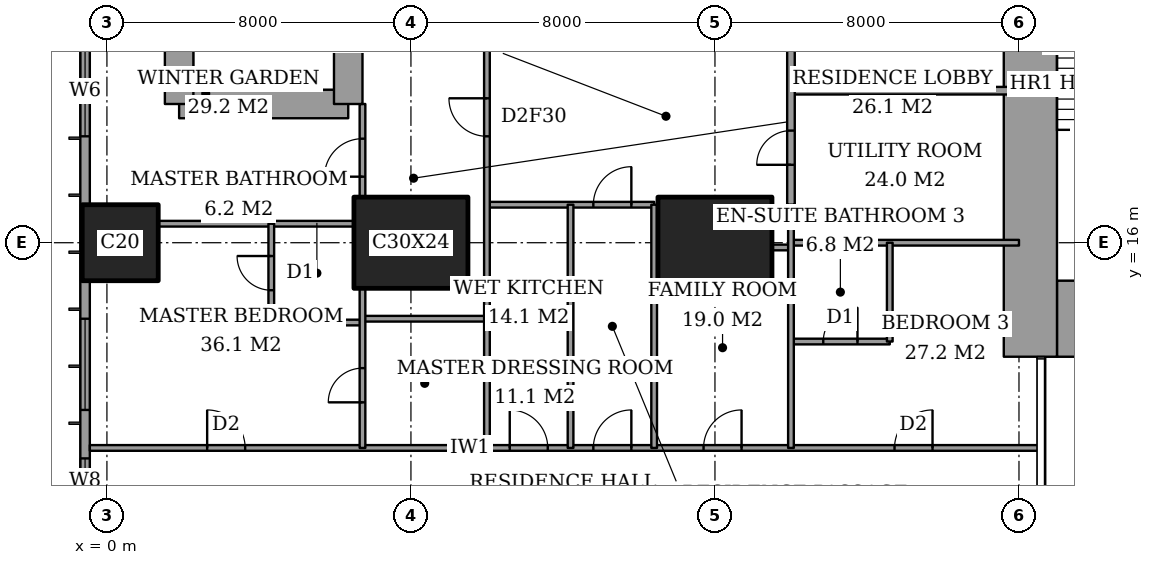
"""IFC4 building model, lengths in metres.
Left out: names, types, materials, properties, quantities, classifications, styles, units other than length and angle.
Written with IfcOpenShell. Run it as: python <this file> out.ifc"""

import sys

from ifc_helpers import new_model, si_unit, direction, frame, frame_2d, origin, origin_2d, place, context, subcontext, project, spatial, rectangle, extrude, element, fill, save


model = new_model("IFC4")
c1 = context("Model", 3, precision=1e-05, world=origin(), true_north=direction((0.0, 1.0)))
c2 = subcontext(c1, "Body", "Model", "MODEL_VIEW")
j1 = project(units=[si_unit("LENGTHUNIT", "METRE"), si_unit("PLANEANGLEUNIT", "RADIAN")], contexts=[c1])
p1 = place(None, origin())
s1 = spatial("IfcSite", under=j1, at=p1, CompositionType="ELEMENT")
p2 = place(p1, origin())
s2 = spatial("IfcBuilding", under=s1, at=p2, CompositionType="ELEMENT")
p3 = place(p2, frame((0.0, 0.0, 40.4)))
s3 = spatial("IfcBuildingStorey", under=s2, at=p3, CompositionType="ELEMENT", Elevation=40.4)
p4 = place(p3, frame((0.35, 16.0, 0.0), z_axis=(0.0, 0.0, 1.0), x_axis=(1.0, 0.0, 0.0)))
e1 = element("IfcColumn", 1, at=p4, inside=s3, PredefinedType="COLUMN", context=c2, shape_type="SweptSolid", body=[
    extrude(rectangle(XDim=2.0, YDim=2.0, at=origin_2d()), origin(), (0.0, 0.0, 1.0), 3.6),
])
for number, where, z_axis, x_axis in (
    (2, (8.0, 16.0, 0.0), (0.0, 0.0, 1.0), (1.0, 0.0, 0.0)),
    (3, (16.0, 16.0, 0.0), (0.0, 0.0, 1.0), (1.0, 0.0, 0.0)),
):
    element("IfcColumn", number, at=place(p3, frame(where, z_axis=z_axis, x_axis=x_axis)), inside=s3, PredefinedType="COLUMN", context=c2, shape_type="SweptSolid", body=[
        extrude(rectangle(XDim=3.0, YDim=2.4, at=origin_2d()), origin(), (0.0, 0.0, 1.0), 3.6),
    ])
p5 = place(p3, frame((25.0, 14.0, 0.0), z_axis=(0.0, 0.0, 1.0), x_axis=(1.0, 0.0, 0.0)))
e4 = element("IfcWall", 4, at=p5, inside=s3, PredefinedType="SHEAR", context=c2, shape_type="SweptSolid", body=[
    extrude(rectangle(XDim=3.15, YDim=2.0, at=frame_2d((1.575, 0.0))), origin(), (0.0, 0.0, 1.0), 3.6),
])
p6 = place(p3, frame((24.3, 13.0, 0.0), z_axis=(0.0, 0.0, 1.0), x_axis=(0.0, 1.0, 0.0)))
e5 = element("IfcWall", 5, at=p6, inside=s3, PredefinedType="SHEAR", context=c2, shape_type="SweptSolid", body=[
    extrude(rectangle(XDim=10.15, YDim=1.4, at=frame_2d((5.075, 0.0))), origin(), (0.0, 0.0, 1.0), 3.6),
])
p7 = place(p3, frame((1.9, 19.65, 0.0), z_axis=(0.0, 0.0, 1.0), x_axis=(1.0, 0.0, 0.0)))
e6 = element("IfcWall", 6, at=p7, inside=s3, PredefinedType="SHEAR", context=c2, shape_type="SweptSolid", body=[
    extrude(rectangle(XDim=4.45, YDim=0.75, at=frame_2d((2.225, 0.0))), origin(), (0.0, 0.0, 1.0), 3.6),
])
p8 = place(p3, frame((6.35, 19.65, 0.0), z_axis=(0.0, 0.0, 1.0), x_axis=(0.0, 1.0, 0.0)))
e7 = element("IfcWall", 7, at=p8, inside=s3, PredefinedType="SHEAR", context=c2, shape_type="SweptSolid", body=[
    extrude(rectangle(XDim=8.7, YDim=0.75, at=frame_2d((4.35, 0.0))), origin(), (0.0, 0.0, 1.0), 3.6),
])
p9 = place(p8, frame((6.725, 0.0, 0.0)))
e8 = element("IfcOpeningElement", 8, at=p9, cuts=e7, PredefinedType="OPENING", context=c2, shape_type="SweptSolid", body=[
    extrude(rectangle(XDim=1.0, YDim=2.1, at=frame_2d((0.5, 1.05))), frame((0.0, 0.385, 0.0), z_axis=(0.0, -1.0, 0.0), x_axis=(1.0, 0.0, 0.0)), (0.0, 0.0, 1.0), 0.77),
])
p10 = place(p3, frame((1.9, 28.35, 0.0), z_axis=(0.0, 0.0, 1.0), x_axis=(0.0, -1.0, 0.0)))
e9 = element("IfcWall", 9, at=p10, inside=s3, PredefinedType="SHEAR", context=c2, shape_type="SweptSolid", body=[
    extrude(rectangle(XDim=8.7, YDim=0.75, at=frame_2d((4.35, 0.0))), origin(), (0.0, 0.0, 1.0), 3.6),
])
p11 = place(p3, frame((-0.575, 44.825, 0.0), z_axis=(0.0, 0.0, 1.0), x_axis=(0.0, -1.0, 0.0)))
e10 = element("IfcWall", 10, at=p11, inside=s3, PredefinedType="SOLIDWALL", context=c2, shape_type="SweptSolid", body=[
    extrude(rectangle(XDim=41.65, YDim=0.25, at=frame_2d((20.825, 0.0))), origin(), (0.0, 0.0, 1.0), 3.6),
])
p12 = place(p11, frame((0.775, 0.0, 0.6)))
e11 = element("IfcOpeningElement", 11, at=p12, cuts=e10, PredefinedType="OPENING", context=c2, shape_type="SweptSolid", body=[
    extrude(rectangle(XDim=2.4, YDim=2.0, at=frame_2d((1.2, 1.0))), frame((0.0, 0.135, 0.0), z_axis=(0.0, -1.0, 0.0), x_axis=(1.0, 0.0, 0.0)), (0.0, 0.0, 1.0), 0.27),
])
p13 = place(p11, frame((6.1, 0.0, 0.6)))
e12 = element("IfcOpeningElement", 12, at=p13, cuts=e10, PredefinedType="OPENING", context=c2, shape_type="SweptSolid", body=[
    extrude(rectangle(XDim=1.2, YDim=2.0, at=frame_2d((0.6, 1.0))), frame((0.0, 0.135, 0.0), z_axis=(0.0, -1.0, 0.0), x_axis=(1.0, 0.0, 0.0)), (0.0, 0.0, 1.0), 0.27),
])
p14 = place(p11, frame((8.425, 0.0, 0.6)))
e13 = element("IfcOpeningElement", 13, at=p14, cuts=e10, PredefinedType="OPENING", context=c2, shape_type="SweptSolid", body=[
    extrude(rectangle(XDim=2.4, YDim=2.0, at=frame_2d((1.2, 1.0))), frame((0.0, 0.135, 0.0), z_axis=(0.0, -1.0, 0.0), x_axis=(1.0, 0.0, 0.0)), (0.0, 0.0, 1.0), 0.27),
])
p15 = place(p11, frame((15.625, 0.0, 0.6)))
e14 = element("IfcOpeningElement", 14, at=p15, cuts=e10, PredefinedType="OPENING", context=c2, shape_type="SweptSolid", body=[
    extrude(rectangle(XDim=2.4, YDim=2.0, at=frame_2d((1.2, 1.0))), frame((0.0, 0.135, 0.0), z_axis=(0.0, -1.0, 0.0), x_axis=(1.0, 0.0, 0.0)), (0.0, 0.0, 1.0), 0.27),
])
p16 = place(p11, frame((23.625, 0.0, 0.6)))
e15 = element("IfcOpeningElement", 15, at=p16, cuts=e10, PredefinedType="OPENING", context=c2, shape_type="SweptSolid", body=[
    extrude(rectangle(XDim=2.4, YDim=2.0, at=frame_2d((1.2, 1.0))), frame((0.0, 0.135, 0.0), z_axis=(0.0, -1.0, 0.0), x_axis=(1.0, 0.0, 0.0)), (0.0, 0.0, 1.0), 0.27),
])
p17 = place(p11, frame((30.825, 0.0, 0.6)))
e16 = element("IfcOpeningElement", 16, at=p17, cuts=e10, PredefinedType="OPENING", context=c2, shape_type="SweptSolid", body=[
    extrude(rectangle(XDim=2.4, YDim=2.0, at=frame_2d((1.2, 1.0))), frame((0.0, 0.135, 0.0), z_axis=(0.0, -1.0, 0.0), x_axis=(1.0, 0.0, 0.0)), (0.0, 0.0, 1.0), 0.27),
])
p18 = place(p11, frame((34.5, 0.0, 0.6)))
e17 = element("IfcOpeningElement", 17, at=p18, cuts=e10, PredefinedType="OPENING", context=c2, shape_type="SweptSolid", body=[
    extrude(rectangle(XDim=1.2, YDim=2.0, at=frame_2d((0.6, 1.0))), frame((0.0, 0.135, 0.0), z_axis=(0.0, -1.0, 0.0), x_axis=(1.0, 0.0, 0.0)), (0.0, 0.0, 1.0), 0.27),
])
p19 = place(p11, frame((38.475, 0.0, 0.6)))
e18 = element("IfcOpeningElement", 18, at=p19, cuts=e10, PredefinedType="OPENING", context=c2, shape_type="SweptSolid", body=[
    extrude(rectangle(XDim=2.4, YDim=2.0, at=frame_2d((1.2, 1.0))), frame((0.0, 0.135, 0.0), z_axis=(0.0, -1.0, 0.0), x_axis=(1.0, 0.0, 0.0)), (0.0, 0.0, 1.0), 0.27),
])
p20 = place(p3, frame((-0.45, 10.6, 0.0), z_axis=(0.0, 0.0, 1.0), x_axis=(1.0, 0.0, 0.0)))
e19 = element("IfcWall", 19, at=p20, inside=s3, PredefinedType="PARTITIONING", context=c2, shape_type="SweptSolid", body=[
    extrude(rectangle(XDim=25.011, YDim=0.15, at=frame_2d((12.505, 0.0))), origin(), (0.0, 0.0, 1.0), 3.35),
])
p21 = place(p20, frame((13.25, 0.0, 0.0)))
e20 = element("IfcOpeningElement", 20, at=p21, cuts=e19, PredefinedType="OPENING", context=c2, shape_type="SweptSolid", body=[
    extrude(rectangle(XDim=1.0, YDim=2.1, at=frame_2d((0.5, 1.05))), frame((0.0, 0.085, 0.0), z_axis=(0.0, -1.0, 0.0), x_axis=(1.0, 0.0, 0.0)), (0.0, 0.0, 1.0), 0.17),
])
p22 = place(p20, frame((3.087, 0.0, 0.0)))
e21 = element("IfcOpeningElement", 21, at=p22, cuts=e19, PredefinedType="OPENING", context=c2, shape_type="SweptSolid", body=[
    extrude(rectangle(XDim=1.0, YDim=2.1, at=frame_2d((0.5, 1.05))), frame((0.0, 0.085, 0.0), z_axis=(0.0, -1.0, 0.0), x_axis=(1.0, 0.0, 0.0)), (0.0, 0.0, 1.0), 0.17),
])
p23 = place(p20, frame((11.05, 0.0, 0.0)))
e22 = element("IfcOpeningElement", 22, at=p23, cuts=e19, PredefinedType="OPENING", context=c2, shape_type="SweptSolid", body=[
    extrude(rectangle(XDim=1.0, YDim=2.1, at=frame_2d((0.5, 1.05))), frame((0.0, 0.085, 0.0), z_axis=(0.0, -1.0, 0.0), x_axis=(1.0, 0.0, 0.0)), (0.0, 0.0, 1.0), 0.17),
])
p24 = place(p20, frame((16.15, 0.0, 0.0)))
e23 = element("IfcOpeningElement", 23, at=p24, cuts=e19, PredefinedType="OPENING", context=c2, shape_type="SweptSolid", body=[
    extrude(rectangle(XDim=1.0, YDim=2.1, at=frame_2d((0.5, 1.05))), frame((0.0, 0.085, 0.0), z_axis=(0.0, -1.0, 0.0), x_axis=(1.0, 0.0, 0.0)), (0.0, 0.0, 1.0), 0.17),
])
p25 = place(p20, frame((21.175, 0.0, 0.0)))
e24 = element("IfcOpeningElement", 24, at=p25, cuts=e19, PredefinedType="OPENING", context=c2, shape_type="SweptSolid", body=[
    extrude(rectangle(XDim=1.0, YDim=2.1, at=frame_2d((0.5, 1.05))), frame((0.0, 0.085, 0.0), z_axis=(0.0, -1.0, 0.0), x_axis=(1.0, 0.0, 0.0)), (0.0, 0.0, 1.0), 0.17),
])
p26 = place(p3, frame((18.0, 13.4, 0.0), z_axis=(0.0, 0.0, 1.0), x_axis=(1.0, 0.0, 0.0)))
e25 = element("IfcWall", 25, at=p26, inside=s3, PredefinedType="PARTITIONING", context=c2, shape_type="SweptSolid", body=[
    extrude(rectangle(XDim=2.6, YDim=0.15, at=frame_2d((1.3, 0.0))), origin(), (0.0, 0.0, 1.0), 3.35),
])
p27 = place(p26, frame((0.85, 0.0, 0.0)))
e26 = element("IfcOpeningElement", 26, at=p27, cuts=e25, PredefinedType="OPENING", context=c2, shape_type="SweptSolid", body=[
    extrude(rectangle(XDim=0.9, YDim=2.1, at=frame_2d((0.45, 1.05))), frame((0.0, 0.085, 0.0), z_axis=(0.0, -1.0, 0.0), x_axis=(1.0, 0.0, 0.0)), (0.0, 0.0, 1.0), 0.17),
])
p28 = place(p3, frame((4.325, 13.9, 0.0), z_axis=(0.0, 0.0, 1.0), x_axis=(1.0, 0.0, 0.0)))
e27 = element("IfcWall", 27, at=p28, inside=s3, PredefinedType="PARTITIONING", context=c2, shape_type="SweptSolid", body=[
    extrude(rectangle(XDim=2.4, YDim=0.15, at=frame_2d((1.2, 0.0))), origin(), (0.0, 0.0, 1.0), 3.35),
])
p29 = place(p3, frame((6.725, 14.0, 0.0), z_axis=(0.0, 0.0, 1.0), x_axis=(1.0, 0.0, 0.0)))
e28 = element("IfcWall", 28, at=p29, inside=s3, PredefinedType="PARTITIONING", context=c2, shape_type="SweptSolid", body=[
    extrude(rectangle(XDim=3.275, YDim=0.15, at=frame_2d((1.637, 0.0))), origin(), (0.0, 0.0, 1.0), 3.35),
])
p30 = place(p3, frame((17.5, 15.875, 0.0), z_axis=(0.0, 0.0, 1.0), x_axis=(1.0, 0.0, 0.0)))
e29 = element("IfcWall", 29, at=p30, inside=s3, PredefinedType="PARTITIONING", context=c2, shape_type="SweptSolid", body=[
    extrude(rectangle(XDim=0.5, YDim=0.15, at=frame_2d((0.25, 0.0))), origin(), (0.0, 0.0, 1.0), 2.634),
])
p31 = place(p3, frame((18.0, 16.0, 0.0), z_axis=(0.0, 0.0, 1.0), x_axis=(1.0, 0.0, 0.0)))
e30 = element("IfcWall", 30, at=p31, inside=s3, PredefinedType="PARTITIONING", context=c2, shape_type="SweptSolid", body=[
    extrude(rectangle(XDim=6.0, YDim=0.15, at=frame_2d((3.0, 0.0))), origin(), (0.0, 0.0, 1.0), 2.634),
])
p32 = place(p3, frame((1.35, 16.5, 0.0), z_axis=(0.0, 0.0, 1.0), x_axis=(1.0, 0.0, 0.0)))
e31 = element("IfcWall", 31, at=p32, inside=s3, PredefinedType="PARTITIONING", context=c2, shape_type="SweptSolid", body=[
    extrude(rectangle(XDim=5.15, YDim=0.15, at=frame_2d((2.575, 0.0))), origin(), (0.0, 0.0, 1.0), 3.35),
])
p33 = place(p3, frame((10.0, 17.0, 0.0), z_axis=(0.0, 0.0, 1.0), x_axis=(1.0, 0.0, 0.0)))
e32 = element("IfcWall", 32, at=p33, inside=s3, PredefinedType="PARTITIONING", context=c2, shape_type="SweptSolid", body=[
    extrude(rectangle(XDim=4.4, YDim=0.15, at=frame_2d((2.2, 0.0))), origin(), (0.0, 0.0, 1.0), 3.35),
])
p34 = place(p33, frame((2.8, 0.0, 0.0)))
e33 = element("IfcOpeningElement", 33, at=p34, cuts=e32, PredefinedType="OPENING", context=c2, shape_type="SweptSolid", body=[
    extrude(rectangle(XDim=1.0, YDim=2.1, at=frame_2d((0.5, 1.05))), frame((0.0, 0.085, 0.0), z_axis=(0.0, -1.0, 0.0), x_axis=(1.0, 0.0, 0.0)), (0.0, 0.0, 1.0), 0.17),
])
p35 = place(p3, frame((18.0, 20.0, 0.0), z_axis=(0.0, 0.0, 1.0), x_axis=(1.0, 0.0, 0.0)))
e34 = element("IfcWall", 34, at=p35, inside=s3, PredefinedType="PARTITIONING", context=c2, shape_type="SweptSolid", body=[
    extrude(rectangle(XDim=6.0, YDim=0.2, at=frame_2d((3.0, 0.0))), origin(), (0.0, 0.0, 1.0), 3.35),
])
p36 = place(p3, frame((4.325, 13.9, 0.0), z_axis=(0.0, 0.0, 1.0), x_axis=(0.0, 1.0, 0.0)))
e35 = element("IfcWall", 35, at=p36, inside=s3, PredefinedType="PARTITIONING", context=c2, shape_type="SweptSolid", body=[
    extrude(rectangle(XDim=2.6, YDim=0.15, at=frame_2d((1.3, 0.0))), origin(), (0.0, 0.0, 1.0), 3.35),
])
p37 = place(p36, frame((0.85, 0.0, 0.0)))
e36 = element("IfcOpeningElement", 36, at=p37, cuts=e35, PredefinedType="OPENING", context=c2, shape_type="SweptSolid", body=[
    extrude(rectangle(XDim=0.9, YDim=2.1, at=frame_2d((0.45, 1.05))), frame((0.0, 0.085, 0.0), z_axis=(0.0, -1.0, 0.0), x_axis=(1.0, 0.0, 0.0)), (0.0, 0.0, 1.0), 0.17),
])
p38 = place(p3, frame((6.725, 10.6, 0.0), z_axis=(0.0, 0.0, 1.0), x_axis=(0.0, 1.0, 0.0)))
e37 = element("IfcWall", 37, at=p38, inside=s3, PredefinedType="PARTITIONING", context=c2, shape_type="SweptSolid", body=[
    extrude(rectangle(XDim=4.2, YDim=0.15, at=frame_2d((2.1, 0.0))), origin(), (0.0, 0.0, 1.0), 3.35),
])
p39 = place(p38, frame((1.2, 0.0, 0.0)))
e38 = element("IfcOpeningElement", 38, at=p39, cuts=e37, PredefinedType="OPENING", context=c2, shape_type="SweptSolid", body=[
    extrude(rectangle(XDim=0.9, YDim=2.1, at=frame_2d((0.45, 1.05))), frame((0.0, 0.085, 0.0), z_axis=(0.0, -1.0, 0.0), x_axis=(1.0, 0.0, 0.0)), (0.0, 0.0, 1.0), 0.17),
])
p40 = place(p3, frame((6.725, 17.2, 0.0), z_axis=(0.0, 0.0, 1.0), x_axis=(0.0, 1.0, 0.0)))
e39 = element("IfcWall", 39, at=p40, inside=s3, PredefinedType="PARTITIONING", context=c2, shape_type="SweptSolid", body=[
    extrude(rectangle(XDim=2.45, YDim=0.15, at=frame_2d((1.225, 0.0))), origin(), (0.0, 0.0, 1.0), 3.35),
])
p41 = place(p40, frame((0.538, 0.0, 0.0)))
e40 = element("IfcOpeningElement", 40, at=p41, cuts=e39, PredefinedType="OPENING", context=c2, shape_type="SweptSolid", body=[
    extrude(rectangle(XDim=1.0, YDim=2.1, at=frame_2d((0.5, 1.05))), frame((0.0, 0.085, 0.0), z_axis=(0.0, -1.0, 0.0), x_axis=(1.0, 0.0, 0.0)), (0.0, 0.0, 1.0), 0.17),
])
p42 = place(p3, frame((10.0, 10.6, 0.0), z_axis=(0.0, 0.0, 1.0), x_axis=(0.0, 1.0, 0.0)))
e41 = element("IfcWall", 41, at=p42, inside=s3, PredefinedType="PARTITIONING", context=c2, shape_type="SweptSolid", body=[
    extrude(rectangle(XDim=11.0, YDim=0.15, at=frame_2d((5.5, 0.0))), origin(), (0.0, 0.0, 1.0), 3.35),
])
p43 = place(p42, frame((8.2, 0.0, 0.0)))
e42 = element("IfcOpeningElement", 42, at=p43, cuts=e41, PredefinedType="OPENING", context=c2, shape_type="SweptSolid", body=[
    extrude(rectangle(XDim=1.0, YDim=2.1, at=frame_2d((0.5, 1.05))), frame((0.0, 0.085, 0.0), z_axis=(0.0, -1.0, 0.0), x_axis=(1.0, 0.0, 0.0)), (0.0, 0.0, 1.0), 0.17),
])
for number, where, z_axis, x_axis in (
    (43, (12.2, 10.6, 0.0), (0.0, 0.0, 1.0), (0.0, 1.0, 0.0)),
    (44, (14.4, 10.6, 0.0), (0.0, 0.0, 1.0), (0.0, 1.0, 0.0)),
):
    element("IfcWall", number, at=place(p3, frame(where, z_axis=z_axis, x_axis=x_axis)), inside=s3, PredefinedType="PARTITIONING", context=c2, shape_type="SweptSolid", body=[
        extrude(rectangle(XDim=6.4, YDim=0.15, at=frame_2d((3.2, 0.0))), origin(), (0.0, 0.0, 1.0), 3.35),
    ])
p44 = place(p3, frame((18.0, 17.0, 0.0), z_axis=(0.0, 0.0, 1.0), x_axis=(0.0, 1.0, 0.0)))
e45 = element("IfcWall", 45, at=p44, inside=s3, PredefinedType="PARTITIONING", context=c2, shape_type="SweptSolid", body=[
    extrude(rectangle(XDim=7.0, YDim=0.2, at=frame_2d((3.5, 0.0))), origin(), (0.0, 0.0, 1.0), 3.35),
])
p45 = place(p44, frame((4.4, 0.0, 0.0)))
e46 = element("IfcOpeningElement", 46, at=p45, cuts=e45, PredefinedType="OPENING", context=c2, shape_type="SweptSolid", body=[
    extrude(rectangle(XDim=1.2, YDim=2.4, at=frame_2d((0.6, 1.2))), frame((0.0, 0.11, 0.0), z_axis=(0.0, -1.0, 0.0), x_axis=(1.0, 0.0, 0.0)), (0.0, 0.0, 1.0), 0.22),
])
p46 = place(p44, frame((1.05, 0.0, 0.0)))
e47 = element("IfcOpeningElement", 47, at=p46, cuts=e45, PredefinedType="OPENING", context=c2, shape_type="SweptSolid", body=[
    extrude(rectangle(XDim=0.9, YDim=2.1, at=frame_2d((0.45, 1.05))), frame((0.0, 0.11, 0.0), z_axis=(0.0, -1.0, 0.0), x_axis=(1.0, 0.0, 0.0)), (0.0, 0.0, 1.0), 0.22),
])
p47 = place(p3, frame((18.0, 10.6, 0.0), z_axis=(0.0, 0.0, 1.0), x_axis=(0.0, 1.0, 0.0)))
e48 = element("IfcWall", 48, at=p47, inside=s3, PredefinedType="PARTITIONING", context=c2, shape_type="SweptSolid", body=[
    extrude(rectangle(XDim=6.4, YDim=0.15, at=frame_2d((3.2, 0.0))), origin(), (0.0, 0.0, 1.0), 3.35),
])
p48 = place(p3, frame((20.6, 13.4, 0.0), z_axis=(0.0, 0.0, 1.0), x_axis=(0.0, 1.0, 0.0)))
e49 = element("IfcWall", 49, at=p48, inside=s3, PredefinedType="PARTITIONING", context=c2, shape_type="SweptSolid", body=[
    extrude(rectangle(XDim=2.6, YDim=0.15, at=frame_2d((1.3, 0.0))), origin(), (0.0, 0.0, 1.0), 3.35),
])
p49 = place(p16, origin())
e50 = element("IfcWindow", 50, at=p49, inside=s3, PartitioningType="SINGLE_PANEL", PredefinedType="WINDOW", context=c2, shape_type="SweptSolid", body=[
    extrude(rectangle(XDim=2.4, YDim=2.0, at=frame_2d((1.2, 1.0))), frame((0.0, 0.03, 0.0), z_axis=(0.0, -1.0, 0.0), x_axis=(1.0, 0.0, 0.0)), (0.0, 0.0, 1.0), 0.06),
])
fill(e15, e50)
p50 = place(p17, origin())
e51 = element("IfcWindow", 51, at=p50, inside=s3, PartitioningType="SINGLE_PANEL", PredefinedType="WINDOW", context=c2, shape_type="SweptSolid", body=[
    extrude(rectangle(XDim=2.4, YDim=2.0, at=frame_2d((1.2, 1.0))), frame((0.0, 0.03, 0.0), z_axis=(0.0, -1.0, 0.0), x_axis=(1.0, 0.0, 0.0)), (0.0, 0.0, 1.0), 0.06),
])
fill(e16, e51)
p51 = place(p18, origin())
e52 = element("IfcWindow", 52, at=p51, inside=s3, PartitioningType="SINGLE_PANEL", PredefinedType="WINDOW", context=c2, shape_type="SweptSolid", body=[
    extrude(rectangle(XDim=1.2, YDim=2.0, at=frame_2d((0.6, 1.0))), frame((0.0, 0.03, 0.0), z_axis=(0.0, -1.0, 0.0), x_axis=(1.0, 0.0, 0.0)), (0.0, 0.0, 1.0), 0.06),
])
fill(e17, e52)
p52 = place(p21, origin())
e53 = element("IfcDoor", 53, at=p52, inside=s3, OperationType="SINGLE_SWING_LEFT", PredefinedType="DOOR", context=c2, shape_type="SweptSolid", body=[
    extrude(rectangle(XDim=1.0, YDim=2.1, at=frame_2d((0.5, 1.05))), frame((0.0, 0.025, 0.0), z_axis=(0.0, -1.0, 0.0), x_axis=(1.0, 0.0, 0.0)), (0.0, 0.0, 1.0), 0.05),
])
fill(e20, e53)
p53 = place(p37, origin())
e54 = element("IfcDoor", 54, at=p53, inside=s3, OperationType="SINGLE_SWING_LEFT", PredefinedType="DOOR", context=c2, shape_type="SweptSolid", body=[
    extrude(rectangle(XDim=0.9, YDim=2.1, at=frame_2d((0.45, 1.05))), frame((0.0, 0.025, 0.0), z_axis=(0.0, -1.0, 0.0), x_axis=(1.0, 0.0, 0.0)), (0.0, 0.0, 1.0), 0.05),
])
fill(e36, e54)
p54 = place(p22, origin())
e55 = element("IfcDoor", 55, at=p54, inside=s3, OperationType="SINGLE_SWING_RIGHT", PredefinedType="DOOR", context=c2, shape_type="SweptSolid", body=[
    extrude(rectangle(XDim=1.0, YDim=2.1, at=frame_2d((0.5, 1.05))), frame((0.0, 0.025, 0.0), z_axis=(0.0, -1.0, 0.0), x_axis=(1.0, 0.0, 0.0)), (0.0, 0.0, 1.0), 0.05),
])
fill(e21, e55)
p55 = place(p41, origin())
e56 = element("IfcDoor", 56, at=p55, inside=s3, OperationType="SINGLE_SWING_RIGHT", PredefinedType="DOOR", context=c2, shape_type="SweptSolid", body=[
    extrude(rectangle(XDim=1.0, YDim=2.1, at=frame_2d((0.5, 1.05))), frame((0.0, 0.025, 0.0), z_axis=(0.0, -1.0, 0.0), x_axis=(1.0, 0.0, 0.0)), (0.0, 0.0, 1.0), 0.05),
])
fill(e40, e56)
p56 = place(p39, origin())
e57 = element("IfcDoor", 57, at=p56, inside=s3, OperationType="SINGLE_SWING_RIGHT", PredefinedType="DOOR", context=c2, shape_type="SweptSolid", body=[
    extrude(rectangle(XDim=0.9, YDim=2.1, at=frame_2d((0.45, 1.05))), frame((0.0, 0.025, 0.0), z_axis=(0.0, -1.0, 0.0), x_axis=(1.0, 0.0, 0.0)), (0.0, 0.0, 1.0), 0.05),
])
fill(e38, e57)
p57 = place(p43, origin())
e58 = element("IfcDoor", 58, at=p57, inside=s3, OperationType="SINGLE_SWING_LEFT", PredefinedType="DOOR", context=c2, shape_type="SweptSolid", body=[
    extrude(rectangle(XDim=1.0, YDim=2.1, at=frame_2d((0.5, 1.05))), frame((0.0, 0.025, 0.0), z_axis=(0.0, -1.0, 0.0), x_axis=(1.0, 0.0, 0.0)), (0.0, 0.0, 1.0), 0.05),
])
fill(e42, e58)
p58 = place(p23, origin())
e59 = element("IfcDoor", 59, at=p58, inside=s3, OperationType="SINGLE_SWING_RIGHT", PredefinedType="DOOR", context=c2, shape_type="SweptSolid", body=[
    extrude(rectangle(XDim=1.0, YDim=2.1, at=frame_2d((0.5, 1.05))), frame((0.0, 0.025, 0.0), z_axis=(0.0, -1.0, 0.0), x_axis=(1.0, 0.0, 0.0)), (0.0, 0.0, 1.0), 0.05),
])
fill(e22, e59)
p59 = place(p34, origin())
e60 = element("IfcDoor", 60, at=p59, inside=s3, OperationType="SINGLE_SWING_LEFT", PredefinedType="DOOR", context=c2, shape_type="SweptSolid", body=[
    extrude(rectangle(XDim=1.0, YDim=2.1, at=frame_2d((0.5, 1.05))), frame((0.0, 0.025, 0.0), z_axis=(0.0, -1.0, 0.0), x_axis=(1.0, 0.0, 0.0)), (0.0, 0.0, 1.0), 0.05),
])
fill(e33, e60)
p60 = place(p24, origin())
e61 = element("IfcDoor", 61, at=p60, inside=s3, OperationType="SINGLE_SWING_LEFT", PredefinedType="DOOR", context=c2, shape_type="SweptSolid", body=[
    extrude(rectangle(XDim=1.0, YDim=2.1, at=frame_2d((0.5, 1.05))), frame((0.0, 0.025, 0.0), z_axis=(0.0, -1.0, 0.0), x_axis=(1.0, 0.0, 0.0)), (0.0, 0.0, 1.0), 0.05),
])
fill(e23, e61)
p61 = place(p27, origin())
e62 = element("IfcDoor", 62, at=p61, inside=s3, OperationType="SINGLE_SWING_LEFT", PredefinedType="DOOR", context=c2, shape_type="SweptSolid", body=[
    extrude(rectangle(XDim=0.9, YDim=2.1, at=frame_2d((0.45, 1.05))), frame((0.0, 0.025, 0.0), z_axis=(0.0, -1.0, 0.0), x_axis=(1.0, 0.0, 0.0)), (0.0, 0.0, 1.0), 0.05),
])
fill(e26, e62)
p62 = place(p25, origin())
e63 = element("IfcDoor", 63, at=p62, inside=s3, OperationType="SINGLE_SWING_LEFT", PredefinedType="DOOR", context=c2, shape_type="SweptSolid", body=[
    extrude(rectangle(XDim=1.0, YDim=2.1, at=frame_2d((0.5, 1.05))), frame((0.0, 0.025, 0.0), z_axis=(0.0, -1.0, 0.0), x_axis=(1.0, 0.0, 0.0)), (0.0, 0.0, 1.0), 0.05),
])
fill(e24, e63)
p63 = place(p46, origin())
e64 = element("IfcDoor", 64, at=p63, inside=s3, OperationType="SINGLE_SWING_RIGHT", PredefinedType="DOOR", context=c2, shape_type="SweptSolid", body=[
    extrude(rectangle(XDim=0.9, YDim=2.1, at=frame_2d((0.45, 1.05))), frame((0.0, 0.025, 0.0), z_axis=(0.0, -1.0, 0.0), x_axis=(1.0, 0.0, 0.0)), (0.0, 0.0, 1.0), 0.05),
])
fill(e47, e64)
save(model, sys.argv[1])
